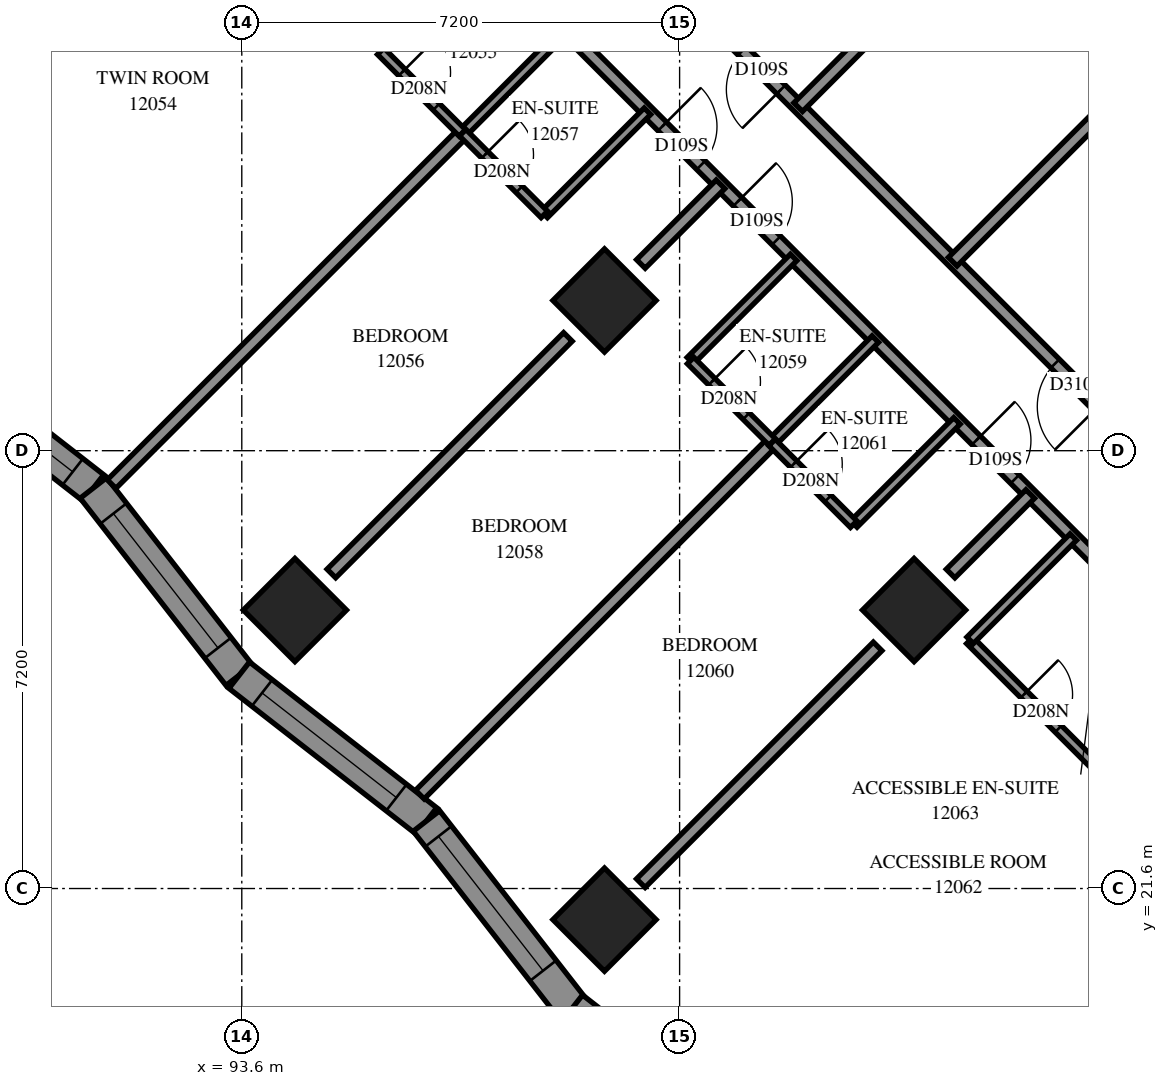
"""IFC4 building model, lengths in metres.
Left out: names, types, materials, properties, quantities, classifications, styles, units other than length and angle.
Written with IfcOpenShell. Run it as: python <this file> out.ifc"""

import sys

from ifc_helpers import new_model, si_unit, direction, frame, frame_2d, origin, origin_2d, place, context, subcontext, project, spatial, polyline, rectangle, outline, extrude, element, fill, save


model = new_model("IFC4")
c1 = context("Model", 3, precision=1e-05, world=origin(), true_north=direction((0.0, 1.0)))
c2 = subcontext(c1, "Body", "Model", "MODEL_VIEW")
j1 = project(units=[si_unit("LENGTHUNIT", "METRE"), si_unit("PLANEANGLEUNIT", "RADIAN")], contexts=[c1])
p1 = place(None, origin())
s1 = spatial("IfcSite", under=j1, at=p1, CompositionType="ELEMENT")
p2 = place(p1, origin())
s2 = spatial("IfcBuilding", under=s1, at=p2, CompositionType="ELEMENT")
p3 = place(p2, frame((0.0, 0.0, 47.4)))
s3 = spatial("IfcBuildingStorey", under=s2, at=p3, CompositionType="ELEMENT", Elevation=47.4)
for number, where, z_axis, x_axis in (
    (1, (99.565, 31.271, 0.0), (0.0, 0.0, 1.0), (0.707, -0.707, 0.0)),
    (2, (94.474, 26.18, 0.0), (0.0, 0.0, 1.0), (0.707, -0.707, 0.0)),
    (3, (104.656, 26.18, 0.0), (0.0, 0.0, 1.0), (0.707, -0.707, 0.0)),
    (4, (99.565, 21.088, 0.0), (0.0, 0.0, 1.0), (0.707, -0.707, 0.0)),
):
    element("IfcColumn", number, at=place(p3, frame(where, z_axis=z_axis, x_axis=x_axis)), inside=s3, PredefinedType="COLUMN", context=c2, shape_type="SweptSolid", body=[
        extrude(rectangle(XDim=1.2, YDim=1.2, at=origin_2d()), origin(), (0.0, 0.0, 1.0), 3.1),
    ])
p4 = place(p3, frame((88.081, 30.585, 0.0), z_axis=(0.0, 0.0, 1.0), x_axis=(0.7890458015, -0.614334374, 0.0)))
e5 = element("IfcWall", 5, at=p4, inside=s3, PredefinedType="SOLIDWALL", context=c2, shape_type="SweptSolid", body=[
    extrude(outline(polyline([(-0.034, -0.275), (3.868, -0.275), (3.937, 0.275), (0.034, 0.275), (-0.034, -0.275)])), origin(), (0.0, 0.0, 1.0), 3.1),
])
p5 = place(p4, frame((0.67, 0.0, 0.5)))
e6 = element("IfcOpeningElement", 6, at=p5, cuts=e5, PredefinedType="OPENING", context=c2, shape_type="SweptSolid", body=[
    extrude(rectangle(XDim=2.8, YDim=2.45, at=frame_2d((1.4, 1.225))), frame((0.0, 0.285, 0.0), z_axis=(0.0, -1.0, 0.0), x_axis=(1.0, 0.0, 0.0)), (0.0, 0.0, 1.0), 0.57),
])
p6 = place(p3, frame((91.16, 28.188, 0.0), z_axis=(0.0, 0.0, 1.0), x_axis=(0.614334374, -0.7890458015, 0.0)))
e7 = element("IfcWall", 7, at=p6, inside=s3, PredefinedType="SOLIDWALL", context=c2, shape_type="SweptSolid", body=[
    extrude(outline(polyline([(0.034, -0.275), (3.937, -0.275), (3.868, 0.275), (-0.034, 0.275), (0.034, -0.275)])), origin(), (0.0, 0.0, 1.0), 3.1),
])
p7 = place(p6, frame((0.534, 0.0, 0.5)))
e8 = element("IfcOpeningElement", 8, at=p7, cuts=e7, PredefinedType="OPENING", context=c2, shape_type="SweptSolid", body=[
    extrude(rectangle(XDim=2.8, YDim=2.45, at=frame_2d((1.4, 1.225))), frame((0.0, 0.285, 0.0), z_axis=(0.0, -1.0, 0.0), x_axis=(1.0, 0.0, 0.0)), (0.0, 0.0, 1.0), 0.57),
])
p8 = place(p3, frame((93.558, 25.108, 0.0), z_axis=(0.0, 0.0, 1.0), x_axis=(0.7890458015, -0.614334374, 0.0)))
e9 = element("IfcWall", 9, at=p8, inside=s3, PredefinedType="SOLIDWALL", context=c2, shape_type="SweptSolid", body=[
    extrude(outline(polyline([(-0.034, -0.275), (3.868, -0.275), (3.937, 0.275), (0.034, 0.275), (-0.034, -0.275)])), origin(), (0.0, 0.0, 1.0), 3.1),
])
p9 = place(p8, frame((0.476, 0.0, 0.5)))
e10 = element("IfcOpeningElement", 10, at=p9, cuts=e9, PredefinedType="OPENING", context=c2, shape_type="SweptSolid", body=[
    extrude(rectangle(XDim=2.8, YDim=2.45, at=frame_2d((1.4, 1.225))), frame((0.0, 0.285, 0.0), z_axis=(0.0, -1.0, 0.0), x_axis=(1.0, 0.0, 0.0)), (0.0, 0.0, 1.0), 0.57),
])
p10 = place(p3, frame((96.637, 22.711, 0.0), z_axis=(0.0, 0.0, 1.0), x_axis=(0.614334374, -0.7890458015, 0.0)))
e11 = element("IfcWall", 11, at=p10, inside=s3, PredefinedType="SOLIDWALL", context=c2, shape_type="SweptSolid", body=[
    extrude(outline(polyline([(0.034, -0.275), (3.937, -0.275), (3.868, 0.275), (-0.034, 0.275), (0.034, -0.275)])), origin(), (0.0, 0.0, 1.0), 3.1),
])
p11 = place(p10, frame((0.321, 0.0, 0.5)))
e12 = element("IfcOpeningElement", 12, at=p11, cuts=e11, PredefinedType="OPENING", context=c2, shape_type="SweptSolid", body=[
    extrude(rectangle(XDim=2.8, YDim=2.45, at=frame_2d((1.4, 1.225))), frame((0.0, 0.285, 0.0), z_axis=(0.0, -1.0, 0.0), x_axis=(1.0, 0.0, 0.0)), (0.0, 0.0, 1.0), 0.57),
])
p12 = place(p3, frame((99.034, 19.632, 0.0), z_axis=(0.0, 0.0, 1.0), x_axis=(0.7890391978, -0.6143428557, 0.0)))
e13 = element("IfcWall", 13, at=p12, inside=s3, PredefinedType="SOLIDWALL", context=c2, shape_type="SweptSolid", body=[
    extrude(outline(polyline([(-0.034, -0.275), (3.868, -0.275), (3.979, 0.275), (0.034, 0.275), (-0.034, -0.275)])), origin(), (0.0, 0.0, 1.0), 3.1),
])
p13 = place(p12, frame((1.001, 0.0, 0.5)))
e14 = element("IfcOpeningElement", 14, at=p13, cuts=e13, PredefinedType="OPENING", context=c2, shape_type="SweptSolid", body=[
    extrude(rectangle(XDim=1.2, YDim=2.45, at=frame_2d((0.6, 1.225))), frame((0.0, 0.285, 0.0), z_axis=(0.0, -1.0, 0.0), x_axis=(1.0, 0.0, 0.0)), (0.0, 0.0, 1.0), 0.57),
])
p14 = place(p3, frame((93.481, 41.167, 0.0), z_axis=(0.0, 0.0, 1.0), x_axis=(0.7071067812, -0.7071067812, 0.0)))
e15 = element("IfcWall", 15, at=p14, inside=s3, PredefinedType="PARTITIONING", context=c2, shape_type="SweptSolid", body=[
    extrude(rectangle(XDim=25.699, YDim=0.2, at=frame_2d((12.85, 0.0))), origin(), (0.0, 0.0, 1.0), 3.1),
])
p15 = place(p14, frame((2.8, 0.0, 0.0)))
e16 = element("IfcOpeningElement", 16, at=p15, cuts=e15, PredefinedType="OPENING", context=c2, shape_type="SweptSolid", body=[
    extrude(rectangle(XDim=0.9, YDim=2.1, at=frame_2d((0.45, 1.05))), frame((0.0, 0.11, 0.0), z_axis=(0.0, -1.0, 0.0), x_axis=(1.0, 0.0, 0.0)), (0.0, 0.0, 1.0), 0.22),
])
p16 = place(p14, frame((9.948, 0.0, 0.0)))
e17 = element("IfcOpeningElement", 17, at=p16, cuts=e15, PredefinedType="OPENING", context=c2, shape_type="SweptSolid", body=[
    extrude(rectangle(XDim=0.9, YDim=2.1, at=frame_2d((0.45, 1.05))), frame((0.0, 0.11, 0.0), z_axis=(0.0, -1.0, 0.0), x_axis=(1.0, 0.0, 0.0)), (0.0, 0.0, 1.0), 0.22),
])
p17 = place(p14, frame((11.7, 0.0, 0.0)))
e18 = element("IfcOpeningElement", 18, at=p17, cuts=e15, PredefinedType="OPENING", context=c2, shape_type="SweptSolid", body=[
    extrude(rectangle(XDim=0.9, YDim=2.1, at=frame_2d((0.45, 1.05))), frame((0.0, 0.11, 0.0), z_axis=(0.0, -1.0, 0.0), x_axis=(1.0, 0.0, 0.0)), (0.0, 0.0, 1.0), 0.22),
])
p18 = place(p14, frame((17.25, 0.0, 0.0)))
e19 = element("IfcOpeningElement", 19, at=p18, cuts=e15, PredefinedType="OPENING", context=c2, shape_type="SweptSolid", body=[
    extrude(rectangle(XDim=0.9, YDim=2.1, at=frame_2d((0.45, 1.05))), frame((0.0, 0.11, 0.0), z_axis=(0.0, -1.0, 0.0), x_axis=(1.0, 0.0, 0.0)), (0.0, 0.0, 1.0), 0.22),
])
p19 = place(p14, frame((22.82, 0.0, 0.0)))
e20 = element("IfcOpeningElement", 20, at=p19, cuts=e15, PredefinedType="OPENING", context=c2, shape_type="SweptSolid", body=[
    extrude(rectangle(XDim=0.9, YDim=2.1, at=frame_2d((0.45, 1.05))), frame((0.0, 0.11, 0.0), z_axis=(0.0, -1.0, 0.0), x_axis=(1.0, 0.0, 0.0)), (0.0, 0.0, 1.0), 0.22),
])
p20 = place(p3, frame((111.352, 25.855, 0.0), z_axis=(0.0, 0.0, 1.0), x_axis=(-0.7070418597, 0.7071716967, 0.0)))
e21 = element("IfcWall", 21, at=p20, inside=s3, PredefinedType="PARTITIONING", context=c2, shape_type="SweptSolid", body=[
    extrude(rectangle(XDim=13.864, YDim=0.2, at=frame_2d((6.932, 0.0))), origin(), (0.0, 0.0, 1.0), 3.1),
])
p21 = place(p20, frame((12.564, 0.0, 0.0)))
e22 = element("IfcOpeningElement", 22, at=p21, cuts=e21, PredefinedType="OPENING", context=c2, shape_type="SweptSolid", body=[
    extrude(rectangle(XDim=0.9, YDim=2.1, at=frame_2d((0.45, 1.05))), frame((0.0, 0.11, 0.0), z_axis=(0.0, -1.0, 0.0), x_axis=(1.0, 0.0, 0.0)), (0.0, 0.0, 1.0), 0.22),
])
p22 = place(p20, frame((5.19, 0.0, 0.0)))
e23 = element("IfcOpeningElement", 23, at=p22, cuts=e21, PredefinedType="OPENING", context=c2, shape_type="SweptSolid", body=[
    extrude(rectangle(XDim=1.0, YDim=2.1, at=frame_2d((0.5, 1.05))), frame((0.0, 0.11, 0.0), z_axis=(0.0, -1.0, 0.0), x_axis=(1.0, 0.0, 0.0)), (0.0, 0.0, 1.0), 0.22),
])
p23 = place(p3, frame((105.292, 31.908, 0.0), z_axis=(0.0, 0.0, 1.0), x_axis=(0.7071067812, 0.7071067812, 0.0)))
e24 = element("IfcWall", 24, at=p23, inside=s3, PredefinedType="PARTITIONING", context=c2, shape_type="SweptSolid", body=[
    extrude(rectangle(XDim=10.979, YDim=0.2, at=frame_2d((5.49, 0.0))), origin(), (0.0, 0.0, 1.0), 3.1),
])
p24 = place(p3, frame((86.317, 33.298, 0.0), z_axis=(0.0, 0.0, 1.0), x_axis=(0.7071020793, 0.7071114831, 0.0)))
e25 = element("IfcWall", 25, at=p24, inside=s3, PredefinedType="PARTITIONING", context=c2, shape_type="SweptSolid", body=[
    extrude(rectangle(XDim=10.634, YDim=0.2, at=frame_2d((5.317, 0.0))), origin(), (0.0, 0.0, 1.0), 3.1),
])
p25 = place(p3, frame((86.836, 34.524, 0.0), z_axis=(0.0, 0.0, 1.0), x_axis=(0.7071067812, 0.7071067812, 0.0)))
e26 = element("IfcWall", 26, at=p25, inside=s3, PredefinedType="PARTITIONING", context=c2, shape_type="SweptSolid", body=[
    extrude(rectangle(XDim=9.399, YDim=0.2, at=frame_2d((4.699, 0.0))), origin(), (0.0, 0.0, 1.0), 3.1),
])
p26 = place(p3, frame((96.528, 23.144, 0.0), z_axis=(0.0, 0.0, 1.0), x_axis=(0.7071067812, 0.7071067812, 0.0)))
e27 = element("IfcWall", 27, at=p26, inside=s3, PredefinedType="PARTITIONING", context=c2, shape_type="SweptSolid", body=[
    extrude(rectangle(XDim=8.195, YDim=0.2, at=frame_2d((4.098, 0.0))), origin(), (0.0, 0.0, 1.0), 3.1),
])
p27 = place(p3, frame((91.459, 28.251, 0.0), z_axis=(0.0, 0.0, 1.0), x_axis=(0.7072292176, 0.7069843236, 0.0)))
e28 = element("IfcWall", 28, at=p27, inside=s3, PredefinedType="PARTITIONING", context=c2, shape_type="SweptSolid", body=[
    extrude(rectangle(XDim=8.167, YDim=0.2, at=frame_2d((4.083, 0.0))), origin(), (0.0, 0.0, 1.0), 3.1),
])
p28 = place(p3, frame((100.162, 21.688, 0.0), z_axis=(0.0, 0.0, 1.0), x_axis=(0.7071067812, 0.7071067812, 0.0)))
e29 = element("IfcWall", 29, at=p28, inside=s3, PredefinedType="PARTITIONING", context=c2, shape_type="SweptSolid", body=[
    extrude(rectangle(XDim=5.507, YDim=0.2, at=frame_2d((2.753, 0.0))), origin(), (0.0, 0.0, 1.0), 3.1),
])
p29 = place(p3, frame((105.255, 16.599, 0.0), z_axis=(0.0, 0.0, 1.0), x_axis=(0.7071067812, 0.7071067812, 0.0)))
e30 = element("IfcWall", 30, at=p29, inside=s3, PredefinedType="PARTITIONING", context=c2, shape_type="SweptSolid", body=[
    extrude(rectangle(XDim=5.504, YDim=0.2, at=frame_2d((2.752, 0.0))), origin(), (0.0, 0.0, 1.0), 2.6),
])
p30 = place(p3, frame((95.073, 26.781, 0.0), z_axis=(0.0, 0.0, 1.0), x_axis=(0.7071067812, 0.7071067812, 0.0)))
e31 = element("IfcWall", 31, at=p30, inside=s3, PredefinedType="PARTITIONING", context=c2, shape_type="SweptSolid", body=[
    extrude(rectangle(XDim=5.501, YDim=0.2, at=frame_2d((2.751, 0.0))), origin(), (0.0, 0.0, 1.0), 3.1),
])
p31 = place(p3, frame((105.573, 25.681, 0.0), z_axis=(0.0, 0.0, 1.0), x_axis=(0.7071067812, -0.7071067812, 0.0)))
e32 = element("IfcWall", 32, at=p31, inside=s3, PredefinedType="PARTITIONING", context=c2, shape_type="SweptSolid", body=[
    extrude(rectangle(XDim=3.199, YDim=0.15, at=frame_2d((1.599, 0.0))), origin(), (0.0, 0.0, 1.0), 3.1),
])
p32 = place(p31, frame((1.258, 0.0, 0.0)))
e33 = element("IfcOpeningElement", 33, at=p32, cuts=e32, PredefinedType="OPENING", context=c2, shape_type="SweptSolid", body=[
    extrude(rectangle(XDim=0.8, YDim=2.1, at=frame_2d((0.4, 1.05))), frame((0.0, 0.085, 0.0), z_axis=(0.0, -1.0, 0.0), x_axis=(1.0, 0.0, 0.0)), (0.0, 0.0, 1.0), 0.17),
])
for number, where, z_axis, x_axis in (
    (34, (100.977, 30.281, 0.0), (0.0, 0.0, 1.0), (0.707, 0.707, 0.0)),
    (35, (98.573, 32.685, 0.0), (0.0, 0.0, 1.0), (0.707, 0.707, 0.0)),
):
    element("IfcWall", number, at=place(p3, frame(where, z_axis=z_axis, x_axis=x_axis)), inside=s3, PredefinedType="PARTITIONING", context=c2, shape_type="SweptSolid", body=[
        extrude(rectangle(XDim=2.401, YDim=0.15, at=frame_2d((1.201, 0.0))), origin(), (0.0, 0.0, 1.0), 3.1),
    ])
for number, where, z_axis, x_axis in (
    (36, (105.578, 25.682, 0.0), (0.0, 0.0, 1.0), (0.707, 0.708, 0.0)),
    (37, (97.234, 34.026, 0.0), (0.0, 0.0, 1.0), (0.707, 0.708, 0.0)),
):
    element("IfcWall", number, at=place(p3, frame(where, z_axis=z_axis, x_axis=x_axis)), inside=s3, PredefinedType="PARTITIONING", context=c2, shape_type="SweptSolid", body=[
        extrude(rectangle(XDim=2.4, YDim=0.15, at=frame_2d((1.2, 0.0))), origin(), (0.0, 0.0, 1.0), 3.1),
    ])
for number, where, z_axis, x_axis in (
    (38, (95.887, 35.373, 0.0), (0.0, 0.0, 1.0), (0.707, 0.707, 0.0)),
    (39, (102.323, 28.939, 0.0), (0.0, 0.0, 1.0), (0.707, 0.707, 0.0)),
    (40, (103.665, 27.595, 0.0), (0.0, 0.0, 1.0), (0.707, 0.707, 0.0)),
):
    element("IfcWall", number, at=place(p3, frame(where, z_axis=z_axis, x_axis=x_axis)), inside=s3, PredefinedType="PARTITIONING", context=c2, shape_type="SweptSolid", body=[
        extrude(rectangle(XDim=2.398, YDim=0.15, at=frame_2d((1.199, 0.0))), origin(), (0.0, 0.0, 1.0), 3.1),
    ])
p33 = place(p3, frame((95.885, 35.369, 0.0), z_axis=(0.0, 0.0, 1.0), x_axis=(0.7071067812, -0.7071067812, 0.0)))
e41 = element("IfcWall", 41, at=p33, inside=s3, PredefinedType="PARTITIONING", context=c2, shape_type="SweptSolid", body=[
    extrude(rectangle(XDim=1.901, YDim=0.15, at=frame_2d((0.95, 0.0))), origin(), (0.0, 0.0, 1.0), 3.1),
])
p34 = place(p33, frame((0.493, 0.0, 0.0)))
e42 = element("IfcOpeningElement", 42, at=p34, cuts=e41, PredefinedType="OPENING", context=c2, shape_type="SweptSolid", body=[
    extrude(rectangle(XDim=0.8, YDim=2.1, at=frame_2d((0.4, 1.05))), frame((0.0, 0.085, 0.0), z_axis=(0.0, -1.0, 0.0), x_axis=(1.0, 0.0, 0.0)), (0.0, 0.0, 1.0), 0.17),
])
p35 = place(p3, frame((100.981, 30.283, 0.0), z_axis=(0.0, 0.0, 1.0), x_axis=(0.7076330979, -0.7065800724, 0.0)))
e43 = element("IfcWall", 43, at=p35, inside=s3, PredefinedType="PARTITIONING", context=c2, shape_type="SweptSolid", body=[
    extrude(rectangle(XDim=1.899, YDim=0.15, at=frame_2d((0.95, 0.0))), origin(), (0.0, 0.0, 1.0), 3.1),
])
p36 = place(p35, frame((0.493, 0.0, 0.0)))
e44 = element("IfcOpeningElement", 44, at=p36, cuts=e43, PredefinedType="OPENING", context=c2, shape_type="SweptSolid", body=[
    extrude(rectangle(XDim=0.8, YDim=2.1, at=frame_2d((0.4, 1.05))), frame((0.0, 0.085, 0.0), z_axis=(0.0, -1.0, 0.0), x_axis=(1.0, 0.0, 0.0)), (0.0, 0.0, 1.0), 0.17),
])
p37 = place(p3, frame((97.233, 34.029, 0.0), z_axis=(0.0, 0.0, 1.0), x_axis=(0.7065800724, -0.7076330979, 0.0)))
e45 = element("IfcWall", 45, at=p37, inside=s3, PredefinedType="PARTITIONING", context=c2, shape_type="SweptSolid", body=[
    extrude(rectangle(XDim=1.899, YDim=0.15, at=frame_2d((0.95, 0.0))), origin(), (0.0, 0.0, 1.0), 3.1),
])
p38 = place(p37, frame((0.515, 0.0, 0.0)))
e46 = element("IfcOpeningElement", 46, at=p38, cuts=e45, PredefinedType="OPENING", context=c2, shape_type="SweptSolid", body=[
    extrude(rectangle(XDim=0.8, YDim=2.1, at=frame_2d((0.4, 1.05))), frame((0.0, 0.085, 0.0), z_axis=(0.0, -1.0, 0.0), x_axis=(1.0, 0.0, 0.0)), (0.0, 0.0, 1.0), 0.17),
])
p39 = place(p3, frame((102.321, 28.935, 0.0), z_axis=(0.0, 0.0, 1.0), x_axis=(0.7065800724, -0.7076330979, 0.0)))
e47 = element("IfcWall", 47, at=p39, inside=s3, PredefinedType="PARTITIONING", context=c2, shape_type="SweptSolid", body=[
    extrude(rectangle(XDim=1.899, YDim=0.15, at=frame_2d((0.95, 0.0))), origin(), (0.0, 0.0, 1.0), 3.1),
])
p40 = place(p39, frame((0.501, 0.0, 0.0)))
e48 = element("IfcOpeningElement", 48, at=p40, cuts=e47, PredefinedType="OPENING", context=c2, shape_type="SweptSolid", body=[
    extrude(rectangle(XDim=0.8, YDim=2.1, at=frame_2d((0.4, 1.05))), frame((0.0, 0.085, 0.0), z_axis=(0.0, -1.0, 0.0), x_axis=(1.0, 0.0, 0.0)), (0.0, 0.0, 1.0), 0.17),
])
p41 = place(p3, frame((100.163, 31.871, 0.0), z_axis=(0.0, 0.0, 1.0), x_axis=(0.7071067812, 0.7071067812, 0.0)))
e49 = element("IfcWall", 49, at=p41, inside=s3, PredefinedType="PARTITIONING", context=c2, shape_type="SweptSolid", body=[
    extrude(rectangle(XDim=1.853, YDim=0.2, at=frame_2d((0.926, 0.0))), origin(), (0.0, 0.0, 1.0), 3.1),
])
for number, where, z_axis, x_axis in (
    (50, (105.256, 26.78, 0.0), (0.0, 0.0, 1.0), (0.708, 0.707, 0.0)),
    (51, (102.75, 34.45, 0.0), (0.0, 0.0, 1.0), (0.707, 0.708, 0.0)),
):
    element("IfcWall", number, at=place(p3, frame(where, z_axis=z_axis, x_axis=x_axis)), inside=s3, PredefinedType="PARTITIONING", context=c2, shape_type="SweptSolid", body=[
        extrude(rectangle(XDim=1.851, YDim=0.2, at=frame_2d((0.926, 0.0))), origin(), (0.0, 0.0, 1.0), 3.1),
    ])
p42 = place(p5, origin())
e52 = element("IfcWindow", 52, at=p42, inside=s3, PartitioningType="SINGLE_PANEL", PredefinedType="WINDOW", context=c2, shape_type="SweptSolid", body=[
    extrude(rectangle(XDim=2.8, YDim=2.45, at=frame_2d((1.4, 1.225))), frame((0.0, 0.155, 0.0), z_axis=(0.0, -1.0, 0.0), x_axis=(1.0, 0.0, 0.0)), (0.0, 0.0, 1.0), 0.06),
])
fill(e6, e52)
p43 = place(p7, origin())
e53 = element("IfcWindow", 53, at=p43, inside=s3, PartitioningType="SINGLE_PANEL", PredefinedType="WINDOW", context=c2, shape_type="SweptSolid", body=[
    extrude(rectangle(XDim=2.8, YDim=2.45, at=frame_2d((1.4, 1.225))), frame((0.0, 0.155, 0.0), z_axis=(0.0, -1.0, 0.0), x_axis=(1.0, 0.0, 0.0)), (0.0, 0.0, 1.0), 0.06),
])
fill(e8, e53)
p44 = place(p9, origin())
e54 = element("IfcWindow", 54, at=p44, inside=s3, PartitioningType="SINGLE_PANEL", PredefinedType="WINDOW", context=c2, shape_type="SweptSolid", body=[
    extrude(rectangle(XDim=2.8, YDim=2.45, at=frame_2d((1.4, 1.225))), frame((0.0, 0.155, 0.0), z_axis=(0.0, -1.0, 0.0), x_axis=(1.0, 0.0, 0.0)), (0.0, 0.0, 1.0), 0.06),
])
fill(e10, e54)
p45 = place(p11, origin())
e55 = element("IfcWindow", 55, at=p45, inside=s3, PartitioningType="SINGLE_PANEL", PredefinedType="WINDOW", context=c2, shape_type="SweptSolid", body=[
    extrude(rectangle(XDim=2.8, YDim=2.45, at=frame_2d((1.4, 1.225))), frame((0.0, 0.155, 0.0), z_axis=(0.0, -1.0, 0.0), x_axis=(1.0, 0.0, 0.0)), (0.0, 0.0, 1.0), 0.06),
])
fill(e12, e55)
p46 = place(p21, origin())
e56 = element("IfcDoor", 56, at=p46, inside=s3, OperationType="SINGLE_SWING_RIGHT", PredefinedType="DOOR", context=c2, shape_type="SweptSolid", body=[
    extrude(rectangle(XDim=0.9, YDim=2.1, at=frame_2d((0.45, 1.05))), frame((0.0, 0.025, 0.0), z_axis=(0.0, -1.0, 0.0), x_axis=(1.0, 0.0, 0.0)), (0.0, 0.0, 1.0), 0.05),
])
fill(e22, e56)
p47 = place(p22, origin())
e57 = element("IfcDoor", 57, at=p47, inside=s3, OperationType="SINGLE_SWING_RIGHT", PredefinedType="DOOR", context=c2, shape_type="SweptSolid", body=[
    extrude(rectangle(XDim=1.0, YDim=2.1, at=frame_2d((0.5, 1.05))), frame((0.0, 0.025, 0.0), z_axis=(0.0, -1.0, 0.0), x_axis=(1.0, 0.0, 0.0)), (0.0, 0.0, 1.0), 0.05),
])
fill(e23, e57)
p48 = place(p34, origin())
e58 = element("IfcDoor", 58, at=p48, inside=s3, OperationType="SINGLE_SWING_RIGHT", PredefinedType="DOOR", context=c2, shape_type="SweptSolid", body=[
    extrude(rectangle(XDim=0.8, YDim=2.1, at=frame_2d((0.4, 1.05))), frame((0.0, 0.025, 0.0), z_axis=(0.0, -1.0, 0.0), x_axis=(1.0, 0.0, 0.0)), (0.0, 0.0, 1.0), 0.05),
])
fill(e42, e58)
p49 = place(p16, origin())
e59 = element("IfcDoor", 59, at=p49, inside=s3, OperationType="SINGLE_SWING_LEFT", PredefinedType="DOOR", context=c2, shape_type="SweptSolid", body=[
    extrude(rectangle(XDim=0.9, YDim=2.1, at=frame_2d((0.45, 1.05))), frame((0.0, 0.025, 0.0), z_axis=(0.0, -1.0, 0.0), x_axis=(1.0, 0.0, 0.0)), (0.0, 0.0, 1.0), 0.05),
])
fill(e17, e59)
p50 = place(p38, origin())
e60 = element("IfcDoor", 60, at=p50, inside=s3, OperationType="SINGLE_SWING_RIGHT", PredefinedType="DOOR", context=c2, shape_type="SweptSolid", body=[
    extrude(rectangle(XDim=0.8, YDim=2.1, at=frame_2d((0.4, 1.05))), frame((0.0, 0.025, 0.0), z_axis=(0.0, -1.0, 0.0), x_axis=(1.0, 0.0, 0.0)), (0.0, 0.0, 1.0), 0.05),
])
fill(e46, e60)
p51 = place(p17, origin())
e61 = element("IfcDoor", 61, at=p51, inside=s3, OperationType="SINGLE_SWING_RIGHT", PredefinedType="DOOR", context=c2, shape_type="SweptSolid", body=[
    extrude(rectangle(XDim=0.9, YDim=2.1, at=frame_2d((0.45, 1.05))), frame((0.0, 0.025, 0.0), z_axis=(0.0, -1.0, 0.0), x_axis=(1.0, 0.0, 0.0)), (0.0, 0.0, 1.0), 0.05),
])
fill(e18, e61)
p52 = place(p36, origin())
e62 = element("IfcDoor", 62, at=p52, inside=s3, OperationType="SINGLE_SWING_RIGHT", PredefinedType="DOOR", context=c2, shape_type="SweptSolid", body=[
    extrude(rectangle(XDim=0.8, YDim=2.1, at=frame_2d((0.4, 1.05))), frame((0.0, 0.025, 0.0), z_axis=(0.0, -1.0, 0.0), x_axis=(1.0, 0.0, 0.0)), (0.0, 0.0, 1.0), 0.05),
])
fill(e44, e62)
p53 = place(p18, origin())
e63 = element("IfcDoor", 63, at=p53, inside=s3, OperationType="SINGLE_SWING_LEFT", PredefinedType="DOOR", context=c2, shape_type="SweptSolid", body=[
    extrude(rectangle(XDim=0.9, YDim=2.1, at=frame_2d((0.45, 1.05))), frame((0.0, 0.025, 0.0), z_axis=(0.0, -1.0, 0.0), x_axis=(1.0, 0.0, 0.0)), (0.0, 0.0, 1.0), 0.05),
])
fill(e19, e63)
p54 = place(p40, origin())
e64 = element("IfcDoor", 64, at=p54, inside=s3, OperationType="SINGLE_SWING_RIGHT", PredefinedType="DOOR", context=c2, shape_type="SweptSolid", body=[
    extrude(rectangle(XDim=0.8, YDim=2.1, at=frame_2d((0.4, 1.05))), frame((0.0, 0.025, 0.0), z_axis=(0.0, -1.0, 0.0), x_axis=(1.0, 0.0, 0.0)), (0.0, 0.0, 1.0), 0.05),
])
fill(e48, e64)
p55 = place(p32, origin())
e65 = element("IfcDoor", 65, at=p55, inside=s3, OperationType="SINGLE_SWING_RIGHT", PredefinedType="DOOR", context=c2, shape_type="SweptSolid", body=[
    extrude(rectangle(XDim=0.8, YDim=2.1, at=frame_2d((0.4, 1.05))), frame((0.0, 0.025, 0.0), z_axis=(0.0, -1.0, 0.0), x_axis=(1.0, 0.0, 0.0)), (0.0, 0.0, 1.0), 0.05),
])
fill(e33, e65)
save(model, sys.argv[1])
